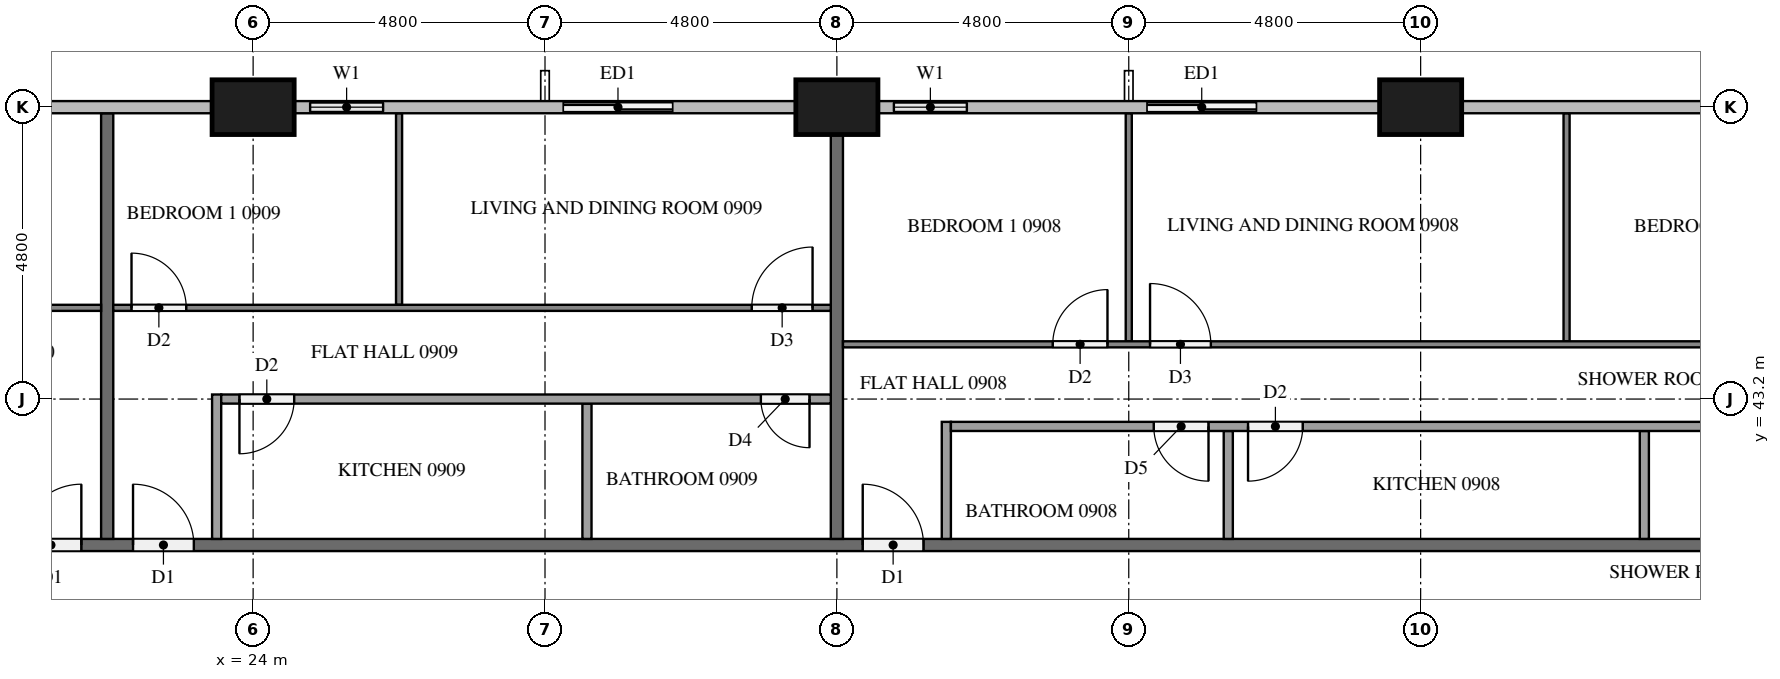
"""IFC4 building model, lengths in metres.
Left out: names, types, materials, properties, quantities, classifications, styles, units other than length and angle.
Written with IfcOpenShell. Run it as: python <this file> out.ifc"""

import sys

from ifc_helpers import new_model, si_unit, direction, frame, frame_2d, origin, origin_2d, place, context, subcontext, project, spatial, rectangle, extrude, element, fill, save


model = new_model("IFC4")
c1 = context("Model", 3, precision=1e-05, world=origin(), true_north=direction((0.0, 1.0)))
c2 = subcontext(c1, "Body", "Model", "MODEL_VIEW")
j1 = project(units=[si_unit("LENGTHUNIT", "METRE"), si_unit("PLANEANGLEUNIT", "RADIAN")], contexts=[c1])
p1 = place(None, origin())
s1 = spatial("IfcSite", under=j1, at=p1, CompositionType="ELEMENT")
p2 = place(p1, origin())
s2 = spatial("IfcBuilding", under=s1, at=p2, CompositionType="ELEMENT")
p3 = place(p2, frame((0.0, 0.0, 39.9)))
s3 = spatial("IfcBuildingStorey", under=s2, at=p3, CompositionType="ELEMENT", Elevation=39.9)
for number, where, z_axis, x_axis in (
    (1, (43.2, 48.0, 0.0), (0.0, 0.0, 1.0), (1.0, 0.0, 0.0)),
    (2, (33.6, 48.0, 0.0), (0.0, 0.0, 1.0), (1.0, 0.0, 0.0)),
    (3, (24.0, 48.0, 0.0), (0.0, 0.0, 1.0), (1.0, 0.0, 0.0)),
):
    element("IfcColumn", number, at=place(p3, frame(where, z_axis=z_axis, x_axis=x_axis)), inside=s3, PredefinedType="COLUMN", context=c2, shape_type="SweptSolid", body=[
        extrude(rectangle(XDim=1.35, YDim=0.9, at=origin_2d()), origin(), (0.0, 0.0, 1.0), 3.2),
    ])
p4 = place(p3, frame((40.8, 48.0, 0.0), z_axis=(0.0, 0.0, 1.0), x_axis=(-1.0, 0.0, 0.0)))
e4 = element("IfcWall", 4, at=p4, inside=s3, PredefinedType="SOLIDWALL", context=c2, shape_type="SweptSolid", body=[
    extrude(rectangle(XDim=2.4, YDim=0.15, at=frame_2d((1.2, 0.0))), origin(), (0.0, 0.0, 1.0), 3.2),
])
p5 = place(p4, frame((0.3, 0.0, 0.0)))
e5 = element("IfcOpeningElement", 5, at=p5, cuts=e4, PredefinedType="OPENING", context=c2, shape_type="SweptSolid", body=[
    extrude(rectangle(XDim=1.8, YDim=2.4, at=frame_2d((0.9, 1.2))), frame((0.0, 0.085, 0.0), z_axis=(0.0, -1.0, 0.0), x_axis=(1.0, 0.0, 0.0)), (0.0, 0.0, 1.0), 0.17),
])
p6 = place(p3, frame((36.0, 48.0, 0.0), z_axis=(0.0, 0.0, 1.0), x_axis=(-1.0, 0.0, 0.0)))
e6 = element("IfcWall", 6, at=p6, inside=s3, PredefinedType="SOLIDWALL", context=c2, shape_type="SweptSolid", body=[
    extrude(rectangle(XDim=1.725, YDim=0.15, at=frame_2d((0.863, 0.0))), origin(), (0.0, 0.0, 1.0), 3.2),
])
p7 = place(p6, frame((0.262, 0.0, 0.9)))
e7 = element("IfcOpeningElement", 7, at=p7, cuts=e6, PredefinedType="OPENING", context=c2, shape_type="SweptSolid", body=[
    extrude(rectangle(XDim=1.2, YDim=1.4, at=frame_2d((0.6, 0.7))), frame((0.0, 0.085, 0.0), z_axis=(0.0, -1.0, 0.0), x_axis=(1.0, 0.0, 0.0)), (0.0, 0.0, 1.0), 0.17),
])
p8 = place(p3, frame((31.2, 48.0, 0.0), z_axis=(0.0, 0.0, 1.0), x_axis=(-1.0, 0.0, 0.0)))
e8 = element("IfcWall", 8, at=p8, inside=s3, PredefinedType="SOLIDWALL", context=c2, shape_type="SweptSolid", body=[
    extrude(rectangle(XDim=2.4, YDim=0.15, at=frame_2d((1.2, 0.0))), origin(), (0.0, 0.0, 1.0), 3.2),
])
p9 = place(p8, frame((0.3, 0.0, 0.0)))
e9 = element("IfcOpeningElement", 9, at=p9, cuts=e8, PredefinedType="OPENING", context=c2, shape_type="SweptSolid", body=[
    extrude(rectangle(XDim=1.8, YDim=2.4, at=frame_2d((0.9, 1.2))), frame((0.0, 0.085, 0.0), z_axis=(0.0, -1.0, 0.0), x_axis=(1.0, 0.0, 0.0)), (0.0, 0.0, 1.0), 0.17),
])
p10 = place(p3, frame((26.4, 48.0, 0.0), z_axis=(0.0, 0.0, 1.0), x_axis=(-1.0, 0.0, 0.0)))
e10 = element("IfcWall", 10, at=p10, inside=s3, PredefinedType="SOLIDWALL", context=c2, shape_type="SweptSolid", body=[
    extrude(rectangle(XDim=1.725, YDim=0.15, at=frame_2d((0.862, 0.0))), origin(), (0.0, 0.0, 1.0), 3.2),
])
p11 = place(p10, frame((0.262, 0.0, 0.9)))
e11 = element("IfcOpeningElement", 11, at=p11, cuts=e10, PredefinedType="OPENING", context=c2, shape_type="SweptSolid", body=[
    extrude(rectangle(XDim=1.2, YDim=1.4, at=frame_2d((0.6, 0.7))), frame((0.0, 0.085, 0.0), z_axis=(0.0, -1.0, 0.0), x_axis=(1.0, 0.0, 0.0)), (0.0, 0.0, 1.0), 0.17),
])
p12 = place(p3, frame((11.9, 40.8, 0.0), z_axis=(0.0, 0.0, 1.0), x_axis=(1.0, 0.0, 0.0)))
e12 = element("IfcWall", 12, at=p12, inside=s3, PredefinedType="PARTITIONING", context=c2, shape_type="SweptSolid", body=[
    extrude(rectangle(XDim=38.6, YDim=0.2, at=frame_2d((19.3, 0.0))), origin(), (0.0, 0.0, 1.0), 3.2),
])
p13 = place(p12, frame((22.125, 0.0, 0.0)))
e13 = element("IfcOpeningElement", 13, at=p13, cuts=e12, PredefinedType="OPENING", context=c2, shape_type="SweptSolid", body=[
    extrude(rectangle(XDim=1.0, YDim=2.1, at=frame_2d((0.5, 1.05))), frame((0.0, 0.11, 0.0), z_axis=(0.0, -1.0, 0.0), x_axis=(1.0, 0.0, 0.0)), (0.0, 0.0, 1.0), 0.22),
])
p14 = place(p12, frame((10.125, 0.0, 0.0)))
e14 = element("IfcOpeningElement", 14, at=p14, cuts=e12, PredefinedType="OPENING", context=c2, shape_type="SweptSolid", body=[
    extrude(rectangle(XDim=1.0, YDim=2.1, at=frame_2d((0.5, 1.05))), frame((0.0, 0.11, 0.0), z_axis=(0.0, -1.0, 0.0), x_axis=(1.0, 0.0, 0.0)), (0.0, 0.0, 1.0), 0.22),
])
p15 = place(p12, frame((8.275, 0.0, 0.0)))
e15 = element("IfcOpeningElement", 15, at=p15, cuts=e12, PredefinedType="OPENING", context=c2, shape_type="SweptSolid", body=[
    extrude(rectangle(XDim=1.0, YDim=2.1, at=frame_2d((0.5, 1.05))), frame((0.0, 0.11, 0.0), z_axis=(0.0, -1.0, 0.0), x_axis=(1.0, 0.0, 0.0)), (0.0, 0.0, 1.0), 0.22),
])
p16 = place(p3, frame((33.6, 47.55, 0.0), z_axis=(0.0, 0.0, 1.0), x_axis=(0.0, -1.0, 0.0)))
e16 = element("IfcWall", 16, at=p16, inside=s3, PredefinedType="PARTITIONING", context=c2, shape_type="SweptSolid", body=[
    extrude(rectangle(XDim=6.65, YDim=0.2, at=frame_2d((3.325, 0.0))), origin(), (0.0, 0.0, 1.0), 3.2),
])
p17 = place(p3, frame((21.6, 47.9, 0.0), z_axis=(0.0, 0.0, 1.0), x_axis=(0.0, -1.0, 0.0)))
e17 = element("IfcWall", 17, at=p17, inside=s3, PredefinedType="PARTITIONING", context=c2, shape_type="SweptSolid", body=[
    extrude(rectangle(XDim=7.0, YDim=0.2, at=frame_2d((3.5, 0.0))), origin(), (0.0, 0.0, 1.0), 3.2),
])
for number, where, z_axis, x_axis in (
    (18, (38.4, 44.15, 0.0), (0.0, 0.0, 1.0), (0.0, 1.0, 0.0)),
    (19, (45.6, 44.15, 0.0), (0.0, 0.0, 1.0), (0.0, 1.0, 0.0)),
):
    element("IfcWall", number, at=place(p3, frame(where, z_axis=z_axis, x_axis=x_axis)), inside=s3, PredefinedType="PARTITIONING", context=c2, shape_type="SweptSolid", body=[
        extrude(rectangle(XDim=3.75, YDim=0.1, at=frame_2d((1.875, 0.0))), origin(), (0.0, 0.0, 1.0), 3.2),
    ])
p18 = place(p3, frame((33.7, 44.1, 0.0), z_axis=(0.0, 0.0, 1.0), x_axis=(1.0, 0.0, 0.0)))
e20 = element("IfcWall", 20, at=p18, inside=s3, PredefinedType="PARTITIONING", context=c2, shape_type="SweptSolid", body=[
    extrude(rectangle(XDim=16.6, YDim=0.1, at=frame_2d((8.3, 0.0))), origin(), (0.0, 0.0, 1.0), 3.2),
])
p19 = place(p18, frame((3.45, 0.0, 0.0)))
e21 = element("IfcOpeningElement", 21, at=p19, cuts=e20, PredefinedType="OPENING", context=c2, shape_type="SweptSolid", body=[
    extrude(rectangle(XDim=0.9, YDim=2.1, at=frame_2d((0.45, 1.05))), frame((0.0, 0.06, 0.0), z_axis=(0.0, -1.0, 0.0), x_axis=(1.0, 0.0, 0.0)), (0.0, 0.0, 1.0), 0.12),
])
p20 = place(p18, frame((5.05, 0.0, 0.0)))
e22 = element("IfcOpeningElement", 22, at=p20, cuts=e20, PredefinedType="OPENING", context=c2, shape_type="SweptSolid", body=[
    extrude(rectangle(XDim=1.0, YDim=2.1, at=frame_2d((0.5, 1.05))), frame((0.0, 0.06, 0.0), z_axis=(0.0, -1.0, 0.0), x_axis=(1.0, 0.0, 0.0)), (0.0, 0.0, 1.0), 0.12),
])
p21 = place(p18, frame((15.4, 0.0, 0.0)))
e23 = element("IfcOpeningElement", 23, at=p21, cuts=e20, PredefinedType="OPENING", context=c2, shape_type="SweptSolid", body=[
    extrude(rectangle(XDim=0.9, YDim=2.1, at=frame_2d((0.45, 1.05))), frame((0.0, 0.06, 0.0), z_axis=(0.0, -1.0, 0.0), x_axis=(1.0, 0.0, 0.0)), (0.0, 0.0, 1.0), 0.12),
])
for number, where, z_axis, x_axis in (
    (24, (40.037, 40.9, 0.0), (0.0, 0.0, 1.0), (0.0, 1.0, 0.0)),
    (25, (46.879, 40.9, 0.0), (0.0, 0.0, 1.0), (0.0, 1.0, 0.0)),
):
    element("IfcWall", number, at=place(p3, frame(where, z_axis=z_axis, x_axis=x_axis)), inside=s3, PredefinedType="PARTITIONING", context=c2, shape_type="SweptSolid", body=[
        extrude(rectangle(XDim=1.775, YDim=0.15, at=frame_2d((0.888, 0.0))), origin(), (0.0, 0.0, 1.0), 3.2),
    ])
p22 = place(p3, frame((35.4, 40.9, 0.0), z_axis=(0.0, 0.0, 1.0), x_axis=(0.0, 1.0, 0.0)))
e26 = element("IfcWall", 26, at=p22, inside=s3, PredefinedType="PARTITIONING", context=c2, shape_type="SweptSolid", body=[
    extrude(rectangle(XDim=1.925, YDim=0.15, at=frame_2d((0.962, 0.0))), origin(), (0.0, 0.0, 1.0), 3.2),
])
p23 = place(p3, frame((50.3, 42.75, 0.0), z_axis=(0.0, 0.0, 1.0), x_axis=(-1.0, 0.0, 0.0)))
e27 = element("IfcWall", 27, at=p23, inside=s3, PredefinedType="PARTITIONING", context=c2, shape_type="SweptSolid", body=[
    extrude(rectangle(XDim=14.825, YDim=0.15, at=frame_2d((7.413, 0.0))), origin(), (0.0, 0.0, 1.0), 3.2),
])
p24 = place(p23, frame((10.588, 0.0, 0.0)))
e28 = element("IfcOpeningElement", 28, at=p24, cuts=e27, PredefinedType="OPENING", context=c2, shape_type="SweptSolid", body=[
    extrude(rectangle(XDim=0.9, YDim=2.1, at=frame_2d((0.45, 1.05))), frame((0.0, 0.085, 0.0), z_axis=(0.0, -1.0, 0.0), x_axis=(1.0, 0.0, 0.0)), (0.0, 0.0, 1.0), 0.17),
])
p25 = place(p23, frame((9.039, 0.0, 0.0)))
e29 = element("IfcOpeningElement", 29, at=p25, cuts=e27, PredefinedType="OPENING", context=c2, shape_type="SweptSolid", body=[
    extrude(rectangle(XDim=0.9, YDim=2.1, at=frame_2d((0.45, 1.05))), frame((0.0, 0.085, 0.0), z_axis=(0.0, -1.0, 0.0), x_axis=(1.0, 0.0, 0.0)), (0.0, 0.0, 1.0), 0.17),
])
p26 = place(p23, frame((0.35, 0.0, 0.0)))
e30 = element("IfcOpeningElement", 30, at=p26, cuts=e27, PredefinedType="OPENING", context=c2, shape_type="SweptSolid", body=[
    extrude(rectangle(XDim=0.8, YDim=2.1, at=frame_2d((0.4, 1.05))), frame((0.0, 0.085, 0.0), z_axis=(0.0, -1.0, 0.0), x_axis=(1.0, 0.0, 0.0)), (0.0, 0.0, 1.0), 0.17),
])
p27 = place(p3, frame((26.4, 44.75, 0.0), z_axis=(0.0, 0.0, 1.0), x_axis=(0.0, 1.0, 0.0)))
e31 = element("IfcWall", 31, at=p27, inside=s3, PredefinedType="PARTITIONING", context=c2, shape_type="SweptSolid", body=[
    extrude(rectangle(XDim=3.15, YDim=0.1, at=frame_2d((1.575, 0.0))), origin(), (0.0, 0.0, 1.0), 3.2),
])
p28 = place(p3, frame((21.7, 44.7, 0.0), z_axis=(0.0, 0.0, 1.0), x_axis=(1.0, 0.0, 0.0)))
e32 = element("IfcWall", 32, at=p28, inside=s3, PredefinedType="PARTITIONING", context=c2, shape_type="SweptSolid", body=[
    extrude(rectangle(XDim=11.8, YDim=0.1, at=frame_2d((5.9, 0.0))), origin(), (0.0, 0.0, 1.0), 3.2),
])
p29 = place(p28, frame((0.3, 0.0, 0.0)))
e33 = element("IfcOpeningElement", 33, at=p29, cuts=e32, PredefinedType="OPENING", context=c2, shape_type="SweptSolid", body=[
    extrude(rectangle(XDim=0.9, YDim=2.1, at=frame_2d((0.45, 1.05))), frame((0.0, 0.06, 0.0), z_axis=(0.0, -1.0, 0.0), x_axis=(1.0, 0.0, 0.0)), (0.0, 0.0, 1.0), 0.12),
])
p30 = place(p28, frame((10.5, 0.0, 0.0)))
e34 = element("IfcOpeningElement", 34, at=p30, cuts=e32, PredefinedType="OPENING", context=c2, shape_type="SweptSolid", body=[
    extrude(rectangle(XDim=1.0, YDim=2.1, at=frame_2d((0.5, 1.05))), frame((0.0, 0.06, 0.0), z_axis=(0.0, -1.0, 0.0), x_axis=(1.0, 0.0, 0.0)), (0.0, 0.0, 1.0), 0.12),
])
p31 = place(p3, frame((29.49, 40.9, 0.0), z_axis=(0.0, 0.0, 1.0), x_axis=(0.0, 1.0, 0.0)))
e35 = element("IfcWall", 35, at=p31, inside=s3, PredefinedType="PARTITIONING", context=c2, shape_type="SweptSolid", body=[
    extrude(rectangle(XDim=2.225, YDim=0.15, at=frame_2d((1.113, 0.0))), origin(), (0.0, 0.0, 1.0), 3.2),
])
p32 = place(p3, frame((23.4, 40.9, 0.0), z_axis=(0.0, 0.0, 1.0), x_axis=(0.0, 1.0, 0.0)))
e36 = element("IfcWall", 36, at=p32, inside=s3, PredefinedType="PARTITIONING", context=c2, shape_type="SweptSolid", body=[
    extrude(rectangle(XDim=2.375, YDim=0.15, at=frame_2d((1.188, 0.0))), origin(), (0.0, 0.0, 1.0), 3.2),
])
p33 = place(p3, frame((33.5, 43.2, 0.0), z_axis=(0.0, 0.0, 1.0), x_axis=(-1.0, 0.0, 0.0)))
e37 = element("IfcWall", 37, at=p33, inside=s3, PredefinedType="PARTITIONING", context=c2, shape_type="SweptSolid", body=[
    extrude(rectangle(XDim=10.025, YDim=0.15, at=frame_2d((5.012, 0.0))), origin(), (0.0, 0.0, 1.0), 3.2),
])
p34 = place(p33, frame((8.825, 0.0, 0.0)))
e38 = element("IfcOpeningElement", 38, at=p34, cuts=e37, PredefinedType="OPENING", context=c2, shape_type="SweptSolid", body=[
    extrude(rectangle(XDim=0.9, YDim=2.1, at=frame_2d((0.45, 1.05))), frame((0.0, 0.085, 0.0), z_axis=(0.0, -1.0, 0.0), x_axis=(1.0, 0.0, 0.0)), (0.0, 0.0, 1.0), 0.17),
])
p35 = place(p33, frame((0.35, 0.0, 0.0)))
e39 = element("IfcOpeningElement", 39, at=p35, cuts=e37, PredefinedType="OPENING", context=c2, shape_type="SweptSolid", body=[
    extrude(rectangle(XDim=0.8, YDim=2.1, at=frame_2d((0.4, 1.05))), frame((0.0, 0.085, 0.0), z_axis=(0.0, -1.0, 0.0), x_axis=(1.0, 0.0, 0.0)), (0.0, 0.0, 1.0), 0.17),
])
p36 = place(p3, frame((12.1, 44.7, 0.0), z_axis=(0.0, 0.0, 1.0), x_axis=(1.0, 0.0, 0.0)))
e40 = element("IfcWall", 40, at=p36, inside=s3, PredefinedType="PARTITIONING", context=c2, shape_type="SweptSolid", body=[
    extrude(rectangle(XDim=9.4, YDim=0.1, at=frame_2d((4.7, 0.0))), origin(), (0.0, 0.0, 1.0), 3.2),
])
p37 = place(p36, frame((5.05, 0.0, 0.0)))
e41 = element("IfcOpeningElement", 41, at=p37, cuts=e40, PredefinedType="OPENING", context=c2, shape_type="SweptSolid", body=[
    extrude(rectangle(XDim=0.9, YDim=2.1, at=frame_2d((0.45, 1.05))), frame((0.0, 0.06, 0.0), z_axis=(0.0, -1.0, 0.0), x_axis=(1.0, 0.0, 0.0)), (0.0, 0.0, 1.0), 0.12),
])
p38 = place(p36, frame((3.35, 0.0, 0.0)))
e42 = element("IfcOpeningElement", 42, at=p38, cuts=e40, PredefinedType="OPENING", context=c2, shape_type="SweptSolid", body=[
    extrude(rectangle(XDim=1.0, YDim=2.1, at=frame_2d((0.5, 1.05))), frame((0.0, 0.06, 0.0), z_axis=(0.0, -1.0, 0.0), x_axis=(1.0, 0.0, 0.0)), (0.0, 0.0, 1.0), 0.12),
])
p39 = place(p5, origin())
e43 = element("IfcDoor", 43, at=p39, inside=s3, OperationType="SLIDING_TO_RIGHT", PredefinedType="DOOR", context=c2, shape_type="SweptSolid", body=[
    extrude(rectangle(XDim=1.8, YDim=2.4, at=frame_2d((0.9, 1.2))), frame((0.0, 0.025, 0.0), z_axis=(0.0, -1.0, 0.0), x_axis=(1.0, 0.0, 0.0)), (0.0, 0.0, 1.0), 0.05),
])
fill(e5, e43)
p40 = place(p7, origin())
e44 = element("IfcWindow", 44, at=p40, inside=s3, PartitioningType="SINGLE_PANEL", PredefinedType="WINDOW", context=c2, shape_type="SweptSolid", body=[
    extrude(rectangle(XDim=1.2, YDim=1.4, at=frame_2d((0.6, 0.7))), frame((0.0, 0.03, 0.0), z_axis=(0.0, -1.0, 0.0), x_axis=(1.0, 0.0, 0.0)), (0.0, 0.0, 1.0), 0.06),
])
fill(e7, e44)
p41 = place(p9, origin())
e45 = element("IfcDoor", 45, at=p41, inside=s3, OperationType="SLIDING_TO_LEFT", PredefinedType="DOOR", context=c2, shape_type="SweptSolid", body=[
    extrude(rectangle(XDim=1.8, YDim=2.4, at=frame_2d((0.9, 1.2))), frame((0.0, 0.025, 0.0), z_axis=(0.0, -1.0, 0.0), x_axis=(1.0, 0.0, 0.0)), (0.0, 0.0, 1.0), 0.05),
])
fill(e9, e45)
p42 = place(p11, origin())
e46 = element("IfcWindow", 46, at=p42, inside=s3, PartitioningType="SINGLE_PANEL", PredefinedType="WINDOW", context=c2, shape_type="SweptSolid", body=[
    extrude(rectangle(XDim=1.2, YDim=1.4, at=frame_2d((0.6, 0.7))), frame((0.0, 0.03, 0.0), z_axis=(0.0, -1.0, 0.0), x_axis=(1.0, 0.0, 0.0)), (0.0, 0.0, 1.0), 0.06),
])
fill(e11, e46)
p43 = place(p13, origin())
e47 = element("IfcDoor", 47, at=p43, inside=s3, OperationType="SINGLE_SWING_LEFT", PredefinedType="DOOR", context=c2, shape_type="SweptSolid", body=[
    extrude(rectangle(XDim=1.0, YDim=2.1, at=frame_2d((0.5, 1.05))), frame((0.0, 0.025, 0.0), z_axis=(0.0, -1.0, 0.0), x_axis=(1.0, 0.0, 0.0)), (0.0, 0.0, 1.0), 0.05),
])
fill(e13, e47)
p44 = place(p14, origin())
e48 = element("IfcDoor", 48, at=p44, inside=s3, OperationType="SINGLE_SWING_LEFT", PredefinedType="DOOR", context=c2, shape_type="SweptSolid", body=[
    extrude(rectangle(XDim=1.0, YDim=2.1, at=frame_2d((0.5, 1.05))), frame((0.0, 0.025, 0.0), z_axis=(0.0, -1.0, 0.0), x_axis=(1.0, 0.0, 0.0)), (0.0, 0.0, 1.0), 0.05),
])
fill(e14, e48)
p45 = place(p15, origin())
e49 = element("IfcDoor", 49, at=p45, inside=s3, OperationType="SINGLE_SWING_RIGHT", PredefinedType="DOOR", context=c2, shape_type="SweptSolid", body=[
    extrude(rectangle(XDim=1.0, YDim=2.1, at=frame_2d((0.5, 1.05))), frame((0.0, 0.025, 0.0), z_axis=(0.0, -1.0, 0.0), x_axis=(1.0, 0.0, 0.0)), (0.0, 0.0, 1.0), 0.05),
])
fill(e15, e49)
p46 = place(p19, origin())
e50 = element("IfcDoor", 50, at=p46, inside=s3, OperationType="SINGLE_SWING_RIGHT", PredefinedType="DOOR", context=c2, shape_type="SweptSolid", body=[
    extrude(rectangle(XDim=0.9, YDim=2.1, at=frame_2d((0.45, 1.05))), frame((0.0, 0.025, 0.0), z_axis=(0.0, -1.0, 0.0), x_axis=(1.0, 0.0, 0.0)), (0.0, 0.0, 1.0), 0.05),
])
fill(e21, e50)
p47 = place(p20, origin())
e51 = element("IfcDoor", 51, at=p47, inside=s3, OperationType="SINGLE_SWING_LEFT", PredefinedType="DOOR", context=c2, shape_type="SweptSolid", body=[
    extrude(rectangle(XDim=1.0, YDim=2.1, at=frame_2d((0.5, 1.05))), frame((0.0, 0.025, 0.0), z_axis=(0.0, -1.0, 0.0), x_axis=(1.0, 0.0, 0.0)), (0.0, 0.0, 1.0), 0.05),
])
fill(e22, e51)
p48 = place(p24, origin())
e52 = element("IfcDoor", 52, at=p48, inside=s3, OperationType="SINGLE_SWING_LEFT", PredefinedType="DOOR", context=c2, shape_type="SweptSolid", body=[
    extrude(rectangle(XDim=0.9, YDim=2.1, at=frame_2d((0.45, 1.05))), frame((0.0, 0.025, 0.0), z_axis=(0.0, -1.0, 0.0), x_axis=(1.0, 0.0, 0.0)), (0.0, 0.0, 1.0), 0.05),
])
fill(e28, e52)
p49 = place(p25, origin())
e53 = element("IfcDoor", 53, at=p49, inside=s3, OperationType="SINGLE_SWING_RIGHT", PredefinedType="DOOR", context=c2, shape_type="SweptSolid", body=[
    extrude(rectangle(XDim=0.9, YDim=2.1, at=frame_2d((0.45, 1.05))), frame((0.0, 0.025, 0.0), z_axis=(0.0, -1.0, 0.0), x_axis=(1.0, 0.0, 0.0)), (0.0, 0.0, 1.0), 0.05),
])
fill(e29, e53)
p50 = place(p29, origin())
e54 = element("IfcDoor", 54, at=p50, inside=s3, OperationType="SINGLE_SWING_LEFT", PredefinedType="DOOR", context=c2, shape_type="SweptSolid", body=[
    extrude(rectangle(XDim=0.9, YDim=2.1, at=frame_2d((0.45, 1.05))), frame((0.0, 0.025, 0.0), z_axis=(0.0, -1.0, 0.0), x_axis=(1.0, 0.0, 0.0)), (0.0, 0.0, 1.0), 0.05),
])
fill(e33, e54)
p51 = place(p30, origin())
e55 = element("IfcDoor", 55, at=p51, inside=s3, OperationType="SINGLE_SWING_RIGHT", PredefinedType="DOOR", context=c2, shape_type="SweptSolid", body=[
    extrude(rectangle(XDim=1.0, YDim=2.1, at=frame_2d((0.5, 1.05))), frame((0.0, 0.025, 0.0), z_axis=(0.0, -1.0, 0.0), x_axis=(1.0, 0.0, 0.0)), (0.0, 0.0, 1.0), 0.05),
])
fill(e34, e55)
p52 = place(p34, origin())
e56 = element("IfcDoor", 56, at=p52, inside=s3, OperationType="SINGLE_SWING_RIGHT", PredefinedType="DOOR", context=c2, shape_type="SweptSolid", body=[
    extrude(rectangle(XDim=0.9, YDim=2.1, at=frame_2d((0.45, 1.05))), frame((0.0, 0.025, 0.0), z_axis=(0.0, -1.0, 0.0), x_axis=(1.0, 0.0, 0.0)), (0.0, 0.0, 1.0), 0.05),
])
fill(e38, e56)
p53 = place(p35, origin())
e57 = element("IfcDoor", 57, at=p53, inside=s3, OperationType="SINGLE_SWING_LEFT", PredefinedType="DOOR", context=c2, shape_type="SweptSolid", body=[
    extrude(rectangle(XDim=0.8, YDim=2.1, at=frame_2d((0.4, 1.05))), frame((0.0, 0.025, 0.0), z_axis=(0.0, -1.0, 0.0), x_axis=(1.0, 0.0, 0.0)), (0.0, 0.0, 1.0), 0.05),
])
fill(e39, e57)
save(model, sys.argv[1])
